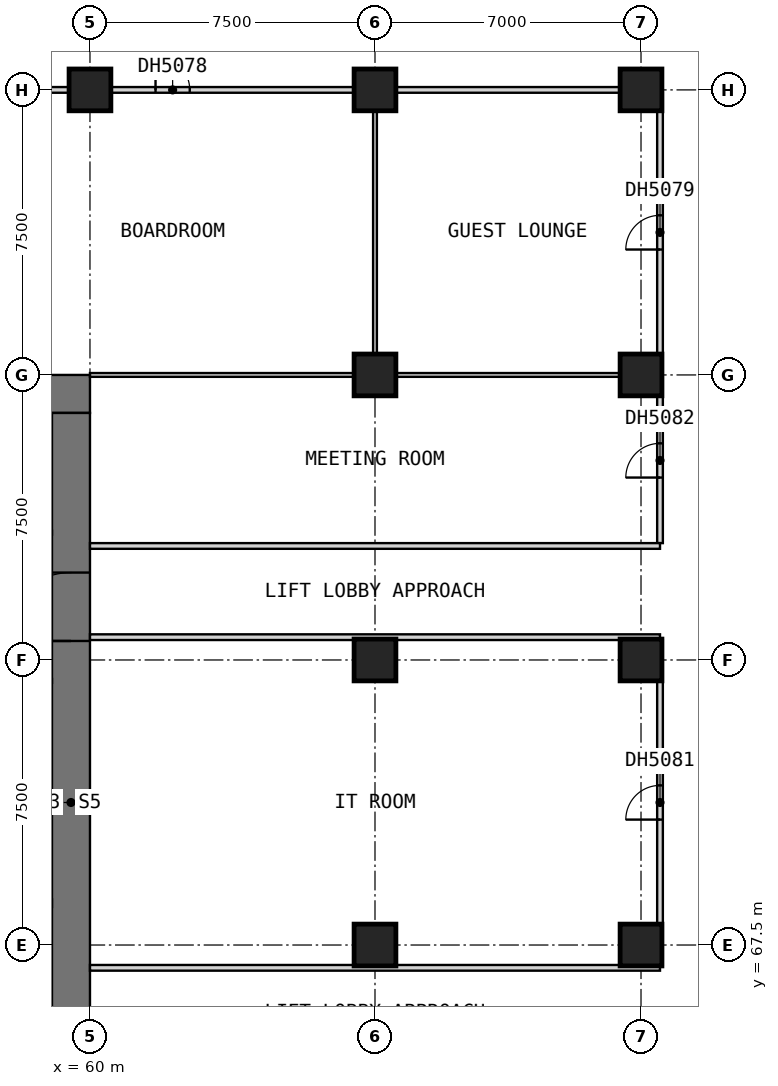
"""IFC4 building model, lengths in metres.
Left out: names, types, materials, properties, quantities, classifications, styles, units other than length and angle.
Written with IfcOpenShell. Run it as: python <this file> out.ifc"""

import sys

from ifc_helpers import new_model, si_unit, direction, frame, frame_2d, origin, origin_2d, place, context, subcontext, project, spatial, rectangle, extrude, element, fill, save


model = new_model("IFC4")
c1 = context("Model", 3, precision=1e-05, world=origin(), true_north=direction((0.0, 1.0)))
c2 = subcontext(c1, "Body", "Model", "MODEL_VIEW")
j1 = project(units=[si_unit("LENGTHUNIT", "METRE"), si_unit("PLANEANGLEUNIT", "RADIAN")], contexts=[c1])
p1 = place(None, origin())
s1 = spatial("IfcSite", under=j1, at=p1, CompositionType="ELEMENT")
p2 = place(p1, origin())
s2 = spatial("IfcBuilding", under=s1, at=p2, CompositionType="ELEMENT")
p3 = place(p2, frame((0.0, 0.0, 79.1)))
s3 = spatial("IfcBuildingStorey", under=s2, at=p3, CompositionType="ELEMENT", Elevation=79.1)
for number, where, z_axis, x_axis in (
    (1, (60.0, 90.0, 0.0), (0.0, 0.0, 1.0), (1.0, 0.0, 0.0)),
    (2, (67.5, 67.5, 0.0), (0.0, 0.0, 1.0), (1.0, 0.0, 0.0)),
    (3, (67.5, 75.0, 0.0), (0.0, 0.0, 1.0), (1.0, 0.0, 0.0)),
    (4, (67.5, 82.5, 0.0), (0.0, 0.0, 1.0), (1.0, 0.0, 0.0)),
    (5, (67.5, 90.0, 0.0), (0.0, 0.0, 1.0), (1.0, 0.0, 0.0)),
    (6, (74.5, 67.5, 0.0), (0.0, 0.0, 1.0), (1.0, 0.0, 0.0)),
    (7, (74.5, 75.0, 0.0), (0.0, 0.0, 1.0), (1.0, 0.0, 0.0)),
    (8, (74.5, 82.5, 0.0), (0.0, 0.0, 1.0), (1.0, 0.0, 0.0)),
    (9, (74.5, 90.0, 0.0), (0.0, 0.0, 1.0), (1.0, 0.0, 0.0)),
):
    element("IfcColumn", number, at=place(p3, frame(where, z_axis=z_axis, x_axis=x_axis)), inside=s3, PredefinedType="COLUMN", context=c2, shape_type="SweptSolid", body=[
        extrude(rectangle(XDim=1.1, YDim=1.1, at=origin_2d()), origin(), (0.0, 0.0, 1.0), 3.6),
    ])
p4 = place(p3, frame((30.0, 82.0, 0.0), z_axis=(0.0, 0.0, 1.0), x_axis=(1.0, 0.0, 0.0)))
e10 = element("IfcWall", 10, at=p4, inside=s3, PredefinedType="SHEAR", context=c2, shape_type="SweptSolid", body=[
    extrude(rectangle(XDim=30.0, YDim=1.0, at=frame_2d((15.0, 0.0))), origin(), (0.0, 0.0, 1.0), 3.6),
])
p5 = place(p3, frame((59.5, 61.0, 0.0), z_axis=(0.0, 0.0, 1.0), x_axis=(0.0, 1.0, 0.0)))
e11 = element("IfcWall", 11, at=p5, inside=s3, PredefinedType="SHEAR", context=c2, shape_type="SweptSolid", body=[
    extrude(rectangle(XDim=20.5, YDim=1.0, at=frame_2d((10.25, 0.0))), origin(), (0.0, 0.0, 1.0), 3.6),
])
p6 = place(p5, frame((14.5, 0.0, 0.0)))
e12 = element("IfcOpeningElement", 12, at=p6, cuts=e11, PredefinedType="OPENING", context=c2, shape_type="SweptSolid", body=[
    extrude(rectangle(XDim=1.8, YDim=2.1, at=frame_2d((0.9, 1.05))), frame((0.0, 0.51, 0.0), z_axis=(0.0, -1.0, 0.0), x_axis=(1.0, 0.0, 0.0)), (0.0, 0.0, 1.0), 1.02),
])
p7 = place(p3, frame((33.75, 90.0, 0.0), z_axis=(0.0, 0.0, 1.0), x_axis=(1.0, 0.0, 0.0)))
e13 = element("IfcWall", 13, at=p7, inside=s3, PredefinedType="PARTITIONING", context=c2, shape_type="SweptSolid", body=[
    extrude(rectangle(XDim=41.25, YDim=0.15, at=frame_2d((20.625, 0.0))), origin(), (0.0, 0.0, 1.0), 3.35),
])
p8 = place(p7, frame((4.425, 0.0, 0.0)))
e14 = element("IfcOpeningElement", 14, at=p8, cuts=e13, PredefinedType="OPENING", context=c2, shape_type="SweptSolid", body=[
    extrude(rectangle(XDim=0.9, YDim=2.1, at=frame_2d((0.45, 1.05))), frame((0.0, 0.085, 0.0), z_axis=(0.0, -1.0, 0.0), x_axis=(1.0, 0.0, 0.0)), (0.0, 0.0, 1.0), 0.17),
])
p9 = place(p7, frame((15.075, 0.0, 0.0)))
e15 = element("IfcOpeningElement", 15, at=p9, cuts=e13, PredefinedType="OPENING", context=c2, shape_type="SweptSolid", body=[
    extrude(rectangle(XDim=0.9, YDim=2.1, at=frame_2d((0.45, 1.05))), frame((0.0, 0.085, 0.0), z_axis=(0.0, -1.0, 0.0), x_axis=(1.0, 0.0, 0.0)), (0.0, 0.0, 1.0), 0.17),
])
p10 = place(p7, frame((27.975, 0.0, 0.0)))
e16 = element("IfcOpeningElement", 16, at=p10, cuts=e13, PredefinedType="OPENING", context=c2, shape_type="SweptSolid", body=[
    extrude(rectangle(XDim=0.9, YDim=2.1, at=frame_2d((0.45, 1.05))), frame((0.0, 0.085, 0.0), z_axis=(0.0, -1.0, 0.0), x_axis=(1.0, 0.0, 0.0)), (0.0, 0.0, 1.0), 0.17),
])
p11 = place(p3, frame((75.0, 66.975, 0.0), z_axis=(0.0, 0.0, 1.0), x_axis=(0.0, 1.0, 0.0)))
e17 = element("IfcWall", 17, at=p11, inside=s3, PredefinedType="PARTITIONING", context=c2, shape_type="SweptSolid", body=[
    extrude(rectangle(XDim=8.55, YDim=0.15, at=frame_2d((4.275, 0.0))), origin(), (0.0, 0.0, 1.0), 3.35),
])
p12 = place(p11, frame((3.825, 0.0, 0.0)))
e18 = element("IfcOpeningElement", 18, at=p12, cuts=e17, PredefinedType="OPENING", context=c2, shape_type="SweptSolid", body=[
    extrude(rectangle(XDim=0.9, YDim=2.1, at=frame_2d((0.45, 1.05))), frame((0.0, 0.085, 0.0), z_axis=(0.0, -1.0, 0.0), x_axis=(1.0, 0.0, 0.0)), (0.0, 0.0, 1.0), 0.17),
])
p13 = place(p3, frame((75.0, 78.075, 0.0), z_axis=(0.0, 0.0, 1.0), x_axis=(0.0, 1.0, 0.0)))
e19 = element("IfcWall", 19, at=p13, inside=s3, PredefinedType="PARTITIONING", context=c2, shape_type="SweptSolid", body=[
    extrude(rectangle(XDim=11.85, YDim=0.15, at=frame_2d((5.925, 0.0))), origin(), (0.0, 0.0, 1.0), 3.35),
])
p14 = place(p13, frame((7.725, 0.0, 0.0)))
e20 = element("IfcOpeningElement", 20, at=p14, cuts=e19, PredefinedType="OPENING", context=c2, shape_type="SweptSolid", body=[
    extrude(rectangle(XDim=0.9, YDim=2.1, at=frame_2d((0.45, 1.05))), frame((0.0, 0.085, 0.0), z_axis=(0.0, -1.0, 0.0), x_axis=(1.0, 0.0, 0.0)), (0.0, 0.0, 1.0), 0.17),
])
p15 = place(p13, frame((1.725, 0.0, 0.0)))
e21 = element("IfcOpeningElement", 21, at=p15, cuts=e19, PredefinedType="OPENING", context=c2, shape_type="SweptSolid", body=[
    extrude(rectangle(XDim=0.9, YDim=2.1, at=frame_2d((0.45, 1.05))), frame((0.0, 0.085, 0.0), z_axis=(0.0, -1.0, 0.0), x_axis=(1.0, 0.0, 0.0)), (0.0, 0.0, 1.0), 0.17),
])
p16 = place(p3, frame((60.0, 82.5, 0.0), z_axis=(0.0, 0.0, 1.0), x_axis=(1.0, 0.0, 0.0)))
e22 = element("IfcWall", 22, at=p16, inside=s3, PredefinedType="PARTITIONING", context=c2, shape_type="SweptSolid", body=[
    extrude(rectangle(XDim=14.925, YDim=0.1, at=frame_2d((7.462, 0.0))), origin(), (0.0, 0.0, 1.0), 3.35),
])
p17 = place(p3, frame((67.5, 82.55, 0.0), z_axis=(0.0, 0.0, 1.0), x_axis=(0.0, 1.0, 0.0)))
e23 = element("IfcWall", 23, at=p17, inside=s3, PredefinedType="PARTITIONING", context=c2, shape_type="SweptSolid", body=[
    extrude(rectangle(XDim=7.375, YDim=0.1, at=frame_2d((3.688, 0.0))), origin(), (0.0, 0.0, 1.0), 3.35),
])
for number, where, z_axis, x_axis in (
    (24, (60.0, 66.9, 0.0), (0.0, 0.0, 1.0), (1.0, 0.0, 0.0)),
    (25, (60.0, 75.6, 0.0), (0.0, 0.0, 1.0), (1.0, 0.0, 0.0)),
    (26, (60.0, 78.0, 0.0), (0.0, 0.0, 1.0), (1.0, 0.0, 0.0)),
):
    element("IfcWall", number, at=place(p3, frame(where, z_axis=z_axis, x_axis=x_axis)), inside=s3, PredefinedType="PARTITIONING", context=c2, shape_type="SweptSolid", body=[
        extrude(rectangle(XDim=15.0, YDim=0.15, at=frame_2d((7.5, 0.0))), origin(), (0.0, 0.0, 1.0), 3.35),
    ])
p18 = place(p6, origin())
e27 = element("IfcDoor", 27, at=p18, inside=s3, OperationType="DOUBLE_DOOR_SINGLE_SWING", PredefinedType="DOOR", context=c2, shape_type="SweptSolid", body=[
    extrude(rectangle(XDim=1.8, YDim=2.1, at=frame_2d((0.9, 1.05))), frame((0.0, 0.025, 0.0), z_axis=(0.0, -1.0, 0.0), x_axis=(1.0, 0.0, 0.0)), (0.0, 0.0, 1.0), 0.05),
])
fill(e12, e27)
p19 = place(p10, origin())
e28 = element("IfcDoor", 28, at=p19, inside=s3, OperationType="SINGLE_SWING_RIGHT", PredefinedType="DOOR", context=c2, shape_type="SweptSolid", body=[
    extrude(rectangle(XDim=0.9, YDim=2.1, at=frame_2d((0.45, 1.05))), frame((0.0, 0.025, 0.0), z_axis=(0.0, -1.0, 0.0), x_axis=(1.0, 0.0, 0.0)), (0.0, 0.0, 1.0), 0.05),
])
fill(e16, e28)
p20 = place(p14, origin())
e29 = element("IfcDoor", 29, at=p20, inside=s3, OperationType="SINGLE_SWING_LEFT", PredefinedType="DOOR", context=c2, shape_type="SweptSolid", body=[
    extrude(rectangle(XDim=0.9, YDim=2.1, at=frame_2d((0.45, 1.05))), frame((0.0, 0.025, 0.0), z_axis=(0.0, -1.0, 0.0), x_axis=(1.0, 0.0, 0.0)), (0.0, 0.0, 1.0), 0.05),
])
fill(e20, e29)
p21 = place(p12, origin())
e30 = element("IfcDoor", 30, at=p21, inside=s3, OperationType="SINGLE_SWING_LEFT", PredefinedType="DOOR", context=c2, shape_type="SweptSolid", body=[
    extrude(rectangle(XDim=0.9, YDim=2.1, at=frame_2d((0.45, 1.05))), frame((0.0, 0.025, 0.0), z_axis=(0.0, -1.0, 0.0), x_axis=(1.0, 0.0, 0.0)), (0.0, 0.0, 1.0), 0.05),
])
fill(e18, e30)
p22 = place(p15, origin())
e31 = element("IfcDoor", 31, at=p22, inside=s3, OperationType="SINGLE_SWING_LEFT", PredefinedType="DOOR", context=c2, shape_type="SweptSolid", body=[
    extrude(rectangle(XDim=0.9, YDim=2.1, at=frame_2d((0.45, 1.05))), frame((0.0, 0.025, 0.0), z_axis=(0.0, -1.0, 0.0), x_axis=(1.0, 0.0, 0.0)), (0.0, 0.0, 1.0), 0.05),
])
fill(e21, e31)
save(model, sys.argv[1])
